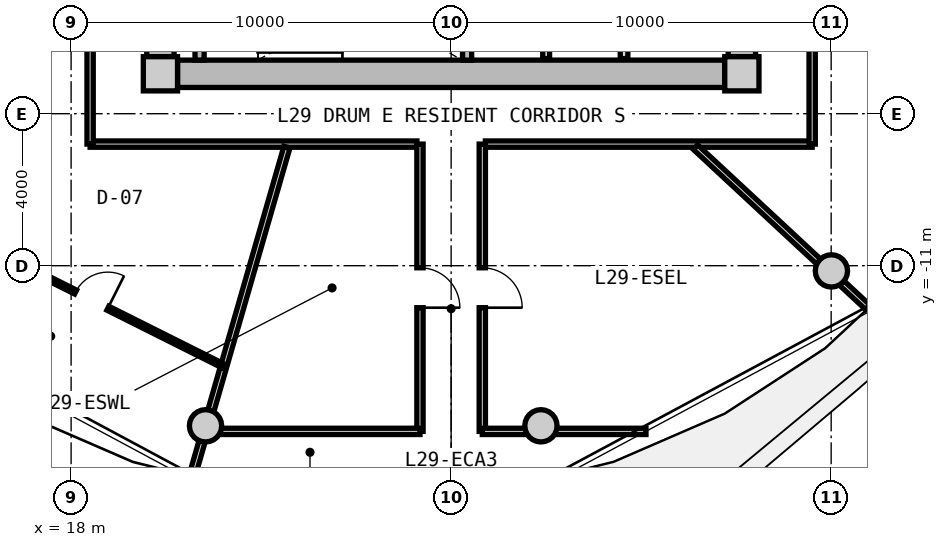
"""IFC4 building model, lengths in metres.
Left out: names, types, materials, properties, quantities, classifications, styles, units other than length and angle.
Written with IfcOpenShell. Run it as: python <this file> out.ifc"""

import sys

from ifc_helpers import new_model, si_unit, direction, frame, frame_2d, origin, origin_2d, place, context, subcontext, project, spatial, rectangle, circle, extrude, source, transform, mapped, element, fill, save


model = new_model("IFC4")
c1 = context("Model", 3, precision=1e-05, world=origin(), true_north=direction((0.0, 1.0)))
c2 = subcontext(c1, "Body", "Model", "MODEL_VIEW")
j1 = project(units=[si_unit("LENGTHUNIT", "METRE"), si_unit("PLANEANGLEUNIT", "RADIAN")], contexts=[c1])
p1 = place(None, origin())
s1 = spatial("IfcSite", under=j1, at=p1, CompositionType="ELEMENT")
p2 = place(p1, origin())
s2 = spatial("IfcBuilding", under=s1, at=p2, CompositionType="ELEMENT")
p3 = place(p2, frame((0.0, 0.0, 96.25)))
s3 = spatial("IfcBuildingStorey", under=s2, at=p3, CompositionType="ELEMENT", Elevation=96.25)
m1 = source(origin(), c2, "Body", "SweptSolid", [
    extrude(rectangle(XDim=0.9, YDim=0.9, at=origin_2d()), origin(), (0.0, 0.0, 1.0), 3.05),
])
for number, where, z_axis, x_axis in (
    (1, (20.35, -5.95, 0.0), (0.0, 0.0, 1.0), (1.0, 0.0, 0.0)),
    (2, (35.65, -5.95, 0.0), (0.0, 0.0, 1.0), (1.0, 0.0, 0.0)),
):
    element("IfcColumn", number, at=place(p3, frame(where, z_axis=z_axis, x_axis=x_axis)), inside=s3, PredefinedType="COLUMN", context=c2, shape_type="MappedRepresentation", body=[
        mapped(m1, transform((0.0, 0.0, 0.0), x_axis=(1.0, 0.0, 0.0), y_axis=(0.0, 1.0, 0.0), z_axis=(0.0, 0.0, 1.0), scale=1.0)),
    ])
m2 = source(origin(), c2, "Body", "SweptSolid", [
    extrude(rectangle(XDim=14.4, YDim=0.72, at=frame_2d((7.2, 0.0))), origin(), (0.0, 0.0, 1.0), 2.79),
])
p4 = place(p3, frame((35.2, -5.95, 0.0), z_axis=(0.0, 0.0, 1.0), x_axis=(-1.0, 0.0, 0.0)))
e3 = element("IfcWall", 3, at=p4, inside=s3, PredefinedType="SHEAR", context=c2, shape_type="MappedRepresentation", body=[
    mapped(m2, transform((0.0, 0.0, 0.0), x_axis=(1.0, 0.0, 0.0), y_axis=(0.0, 1.0, 0.0), z_axis=(0.0, 0.0, 1.0), scale=1.0)),
])
m3 = source(origin(), c2, "Body", "SweptSolid", [
    extrude(rectangle(XDim=11.0, YDim=0.72, at=frame_2d((5.5, 0.0))), origin(), (0.0, 0.0, 1.0), 2.79),
])
p5 = place(p3, frame((20.35, -5.5, 0.0), z_axis=(0.0, 0.0, 1.0), x_axis=(0.0, 1.0, 0.0)))
e4 = element("IfcWall", 4, at=p5, inside=s3, PredefinedType="SHEAR", context=c2, shape_type="MappedRepresentation", body=[
    mapped(m3, transform((0.0, 0.0, 0.0), x_axis=(1.0, 0.0, 0.0), y_axis=(0.0, 1.0, 0.0), z_axis=(0.0, 0.0, 1.0), scale=1.0)),
])
p6 = place(p5, frame((3.8, 0.0, 0.0)))
e5 = element("IfcOpeningElement", 5, at=p6, cuts=e4, PredefinedType="OPENING", context=c2, shape_type="SweptSolid", body=[
    extrude(rectangle(XDim=1.2, YDim=2.15, at=frame_2d((0.6, 1.075))), frame((0.0, 0.37, 0.0), z_axis=(0.0, -1.0, 0.0), x_axis=(1.0, 0.0, 0.0)), (0.0, 0.0, 1.0), 0.74),
])
p7 = place(p3, frame((35.65, 5.5, 0.0), z_axis=(0.0, 0.0, 1.0), x_axis=(0.0, -1.0, 0.0)))
e6 = element("IfcWall", 6, at=p7, inside=s3, PredefinedType="SHEAR", context=c2, shape_type="MappedRepresentation", body=[
    mapped(m3, transform((0.0, 0.0, 0.0), x_axis=(1.0, 0.0, 0.0), y_axis=(0.0, 1.0, 0.0), z_axis=(0.0, 0.0, 1.0), scale=1.0)),
])
p8 = place(p7, frame((5.65, 0.0, 0.0)))
e7 = element("IfcOpeningElement", 7, at=p8, cuts=e6, PredefinedType="OPENING", context=c2, shape_type="SweptSolid", body=[
    extrude(rectangle(XDim=1.2, YDim=2.15, at=frame_2d((0.6, 1.075))), frame((0.0, 0.37, 0.0), z_axis=(0.0, -1.0, 0.0), x_axis=(1.0, 0.0, 0.0)), (0.0, 0.0, 1.0), 0.74),
])
p9 = place(p7, frame((9.3, 0.0, 0.0)))
e8 = element("IfcOpeningElement", 8, at=p9, cuts=e6, PredefinedType="OPENING", context=c2, shape_type="SweptSolid", body=[
    extrude(rectangle(XDim=1.0, YDim=2.1, at=frame_2d((0.5, 1.05))), frame((0.0, 0.37, 0.0), z_axis=(0.0, -1.0, 0.0), x_axis=(1.0, 0.0, 0.0)), (0.0, 0.0, 1.0), 0.74),
])
m4 = source(origin(), c2, "Body", "SweptSolid", [
    extrude(circle(Radius=0.425, at=origin_2d()), origin(), (0.0, 0.0, 1.0), 3.05),
])
for number, where, z_axis, x_axis in (
    (9, (21.537, -15.213, 0.0), (0.0, 0.0, 1.0), (1.0, 0.0, 0.0)),
    (10, (30.363, -15.213, 0.0), (0.0, 0.0, 1.0), (1.0, 0.0, 0.0)),
    (11, (38.006, -11.137, 0.0), (0.0, 0.0, 1.0), (1.0, 0.0, 0.0)),
):
    element("IfcColumn", number, at=place(p3, frame(where, z_axis=z_axis, x_axis=x_axis)), inside=s3, PredefinedType="COLUMN", context=c2, shape_type="MappedRepresentation", body=[
        mapped(m4, transform((0.0, 0.0, 0.0), x_axis=(1.0, 0.0, 0.0), y_axis=(0.0, 1.0, 0.0), z_axis=(0.0, 0.0, 1.0), scale=1.0)),
    ])
m5 = source(origin(), c2, "Body", "SweptSolid", [
    extrude(rectangle(XDim=3.14, YDim=0.24, at=frame_2d((1.57, 0.0))), origin(), (0.0, 0.0, 1.0), 2.79),
])
for number, where, z_axis, x_axis in (
    (12, (21.38, -5.59, 0.0), (0.0, 0.0, 1.0), (0.0, 1.0, 0.0)),
    (13, (28.42, -5.59, 0.0), (0.0, 0.0, 1.0), (0.0, 1.0, 0.0)),
):
    element("IfcWall", number, at=place(p3, frame(where, z_axis=z_axis, x_axis=x_axis)), inside=s3, PredefinedType="PARTITIONING", context=c2, shape_type="MappedRepresentation", body=[
        mapped(m5, transform((0.0, 0.0, 0.0), x_axis=(1.0, 0.0, 0.0), y_axis=(0.0, 1.0, 0.0), z_axis=(0.0, 0.0, 1.0), scale=1.0)),
    ])
m6 = source(origin(), c2, "Body", "SweptSolid", [
    extrude(rectangle(XDim=3.8, YDim=0.2, at=frame_2d((1.9, 0.0))), origin(), (0.0, 0.0, 1.0), 2.775),
])
p10 = place(p3, frame((32.55, -5.55, 0.0), z_axis=(0.0, 0.0, 1.0), x_axis=(0.0, 1.0, 0.0)))
e14 = element("IfcWall", 14, at=p10, inside=s3, PredefinedType="PARTITIONING", context=c2, shape_type="MappedRepresentation", body=[
    mapped(m6, transform((0.0, 0.0, 0.0), x_axis=(1.0, 0.0, 0.0), y_axis=(0.0, 1.0, 0.0), z_axis=(0.0, 0.0, 1.0), scale=1.0)),
])
m7 = source(origin(), c2, "Body", "SweptSolid", [
    extrude(rectangle(XDim=3.22, YDim=0.18, at=frame_2d((1.61, 0.0))), origin(), (0.0, 0.0, 1.0), 2.775),
])
p11 = place(p3, frame((30.5, -5.55, 0.0), z_axis=(0.0, 0.0, 1.0), x_axis=(0.0, 1.0, 0.0)))
e15 = element("IfcWall", 15, at=p11, inside=s3, PredefinedType="PARTITIONING", context=c2, shape_type="MappedRepresentation", body=[
    mapped(m7, transform((0.0, 0.0, 0.0), x_axis=(1.0, 0.0, 0.0), y_axis=(0.0, 1.0, 0.0), z_axis=(0.0, 0.0, 1.0), scale=1.0)),
])
m8 = source(origin(), c2, "Body", "SweptSolid", [
    extrude(rectangle(XDim=8.6, YDim=0.165, at=frame_2d((4.3, 0.0))), origin(), (0.0, 0.0, 1.0), 2.775),
])
for number, where, z_axis, x_axis in (
    (16, (37.5, -7.8, 0.0), (0.0, 0.0, 1.0), (-1.0, 0.0, 0.0)),
    (17, (27.1, -7.8, 0.0), (0.0, 0.0, 1.0), (-1.0, 0.0, 0.0)),
):
    element("IfcWall", number, at=place(p3, frame(where, z_axis=z_axis, x_axis=x_axis)), inside=s3, PredefinedType="PARTITIONING", context=c2, shape_type="MappedRepresentation", body=[
        mapped(m8, transform((0.0, 0.0, 0.0), x_axis=(1.0, 0.0, 0.0), y_axis=(0.0, 1.0, 0.0), z_axis=(0.0, 0.0, 1.0), scale=1.0)),
    ])
m9 = source(origin(), c2, "Body", "SweptSolid", [
    extrude(rectangle(XDim=15.6, YDim=0.165, at=frame_2d((7.8, 0.0))), origin(), (0.0, 0.0, 1.0), 2.775),
])
p12 = place(p3, frame((18.5, -7.8, 0.0), z_axis=(0.0, 0.0, 1.0), x_axis=(0.0, 1.0, 0.0)))
e18 = element("IfcWall", 18, at=p12, inside=s3, PredefinedType="PARTITIONING", context=c2, shape_type="MappedRepresentation", body=[
    mapped(m9, transform((0.0, 0.0, 0.0), x_axis=(1.0, 0.0, 0.0), y_axis=(0.0, 1.0, 0.0), z_axis=(0.0, 0.0, 1.0), scale=1.0)),
])
p13 = place(p12, frame((5.673, 0.0, 0.0)))
e19 = element("IfcOpeningElement", 19, at=p13, cuts=e18, PredefinedType="OPENING", context=c2, shape_type="SweptSolid", body=[
    extrude(rectangle(XDim=1.05, YDim=2.15, at=frame_2d((0.525, 1.075))), frame((0.0, 0.093, 0.0), z_axis=(0.0, -1.0, 0.0), x_axis=(1.0, 0.0, 0.0)), (0.0, 0.0, 1.0), 0.185),
])
p14 = place(p3, frame((37.5, 7.8, 0.0), z_axis=(0.0, 0.0, 1.0), x_axis=(0.0, -1.0, 0.0)))
e20 = element("IfcWall", 20, at=p14, inside=s3, PredefinedType="PARTITIONING", context=c2, shape_type="MappedRepresentation", body=[
    mapped(m9, transform((0.0, 0.0, 0.0), x_axis=(1.0, 0.0, 0.0), y_axis=(0.0, 1.0, 0.0), z_axis=(0.0, 0.0, 1.0), scale=1.0)),
])
p15 = place(p14, frame((9.482, 0.0, 0.0)))
e21 = element("IfcOpeningElement", 21, at=p15, cuts=e20, PredefinedType="OPENING", context=c2, shape_type="SweptSolid", body=[
    extrude(rectangle(XDim=1.25, YDim=2.2, at=frame_2d((0.625, 1.1))), frame((0.0, 0.093, 0.0), z_axis=(0.0, -1.0, 0.0), x_axis=(1.0, 0.0, 0.0)), (0.0, 0.0, 1.0), 0.185),
])
m10 = source(origin(), c2, "Body", "SweptSolid", [
    extrude(rectangle(XDim=8.989, YDim=0.165, at=frame_2d((4.495, 0.0))), origin(), (0.0, 0.0, 1.0), 2.275),
])
p16 = place(p3, frame((23.678, -7.88, 0.0), z_axis=(0.0, 0.0, 1.0), x_axis=(-0.27702323008, -0.960863221274, 0.0)))
e22 = element("IfcWall", 22, at=p16, inside=s3, PredefinedType="PARTITIONING", context=c2, shape_type="MappedRepresentation", body=[
    mapped(m10, transform((0.0, 0.0, 0.0), x_axis=(1.0, 0.0, 0.0), y_axis=(0.0, 1.0, 0.0), z_axis=(0.0, 0.0, 1.0), scale=1.0)),
])
m11 = source(origin(), c2, "Body", "SweptSolid", [
    extrude(rectangle(XDim=6.187, YDim=0.165, at=frame_2d((3.093, 0.0))), origin(), (0.0, 0.0, 1.0), 2.275),
])
p17 = place(p3, frame((34.429, -7.88, 0.0), z_axis=(0.0, 0.0, 1.0), x_axis=(0.732501077882, -0.680765870841, 0.0)))
e23 = element("IfcWall", 23, at=p17, inside=s3, PredefinedType="PARTITIONING", context=c2, shape_type="MappedRepresentation", body=[
    mapped(m11, transform((0.0, 0.0, 0.0), x_axis=(1.0, 0.0, 0.0), y_axis=(0.0, 1.0, 0.0), z_axis=(0.0, 0.0, 1.0), scale=1.0)),
])
m12 = source(origin(), c2, "Body", "SweptSolid", [
    extrude(rectangle(XDim=7.56, YDim=0.165, at=frame_2d((3.78, 0.0))), origin(), (0.0, 0.0, 1.0), 2.775),
])
p18 = place(p3, frame((27.18, -15.36, 0.0), z_axis=(0.0, 0.0, 1.0), x_axis=(0.0, 1.0, 0.0)))
e24 = element("IfcWall", 24, at=p18, inside=s3, PredefinedType="PARTITIONING", context=c2, shape_type="MappedRepresentation", body=[
    mapped(m12, transform((0.0, 0.0, 0.0), x_axis=(1.0, 0.0, 0.0), y_axis=(0.0, 1.0, 0.0), z_axis=(0.0, 0.0, 1.0), scale=1.0)),
])
p19 = place(p18, frame((3.255, 0.0, 0.0)))
e25 = element("IfcOpeningElement", 25, at=p19, cuts=e24, PredefinedType="OPENING", context=c2, shape_type="SweptSolid", body=[
    extrude(rectangle(XDim=1.05, YDim=2.15, at=frame_2d((0.525, 1.075))), frame((0.0, 0.093, 0.0), z_axis=(0.0, -1.0, 0.0), x_axis=(1.0, 0.0, 0.0)), (0.0, 0.0, 1.0), 0.185),
])
m13 = source(origin(), c2, "Body", "SweptSolid", [
    extrude(rectangle(XDim=5.814, YDim=0.165, at=frame_2d((2.907, 0.0))), origin(), (0.0, 0.0, 1.0), 2.275),
])
p20 = place(p3, frame((21.366, -15.36, 0.0), z_axis=(0.0, 0.0, 1.0), x_axis=(1.0, 0.0, 0.0)))
e26 = element("IfcWall", 26, at=p20, inside=s3, PredefinedType="PARTITIONING", context=c2, shape_type="MappedRepresentation", body=[
    mapped(m13, transform((0.0, 0.0, 0.0), x_axis=(1.0, 0.0, 0.0), y_axis=(0.0, 1.0, 0.0), z_axis=(0.0, 0.0, 1.0), scale=1.0)),
])
p21 = place(p3, frame((28.82, -15.36, 0.0), z_axis=(0.0, 0.0, 1.0), x_axis=(0.0, 1.0, 0.0)))
e27 = element("IfcWall", 27, at=p21, inside=s3, PredefinedType="PARTITIONING", context=c2, shape_type="MappedRepresentation", body=[
    mapped(m12, transform((0.0, 0.0, 0.0), x_axis=(1.0, 0.0, 0.0), y_axis=(0.0, 1.0, 0.0), z_axis=(0.0, 0.0, 1.0), scale=1.0)),
])
p22 = place(p21, frame((3.255, 0.0, 0.0)))
e28 = element("IfcOpeningElement", 28, at=p22, cuts=e27, PredefinedType="OPENING", context=c2, shape_type="SweptSolid", body=[
    extrude(rectangle(XDim=1.05, YDim=2.15, at=frame_2d((0.525, 1.075))), frame((0.0, 0.093, 0.0), z_axis=(0.0, -1.0, 0.0), x_axis=(1.0, 0.0, 0.0)), (0.0, 0.0, 1.0), 0.185),
])
m14 = source(origin(), c2, "Body", "SweptSolid", [
    extrude(rectangle(XDim=4.307, YDim=0.165, at=frame_2d((2.153, 0.0))), origin(), (0.0, 0.0, 1.0), 2.275),
])
p23 = place(p3, frame((28.82, -15.36, 0.0), z_axis=(0.0, 0.0, 1.0), x_axis=(1.0, 0.0, 0.0)))
e29 = element("IfcWall", 29, at=p23, inside=s3, PredefinedType="PARTITIONING", context=c2, shape_type="MappedRepresentation", body=[
    mapped(m14, transform((0.0, 0.0, 0.0), x_axis=(1.0, 0.0, 0.0), y_axis=(0.0, 1.0, 0.0), z_axis=(0.0, 0.0, 1.0), scale=1.0)),
])
m15 = source(origin(), c2, "Body", "SweptSolid", [
    extrude(rectangle(XDim=7.767, YDim=0.115, at=frame_2d((3.884, 0.0))), origin(), (0.0, 0.0, 1.0), 2.775),
])
p24 = place(p3, frame((15.07, -10.167, 0.0), z_axis=(0.0, 0.0, 1.0), x_axis=(0.894188177352, -0.447691303783, 0.0)))
e30 = element("IfcWall", 30, at=p24, inside=s3, PredefinedType="PARTITIONING", context=c2, shape_type="MappedRepresentation", body=[
    mapped(m15, transform((0.0, 0.0, 0.0), x_axis=(1.0, 0.0, 0.0), y_axis=(0.0, 1.0, 0.0), z_axis=(0.0, 0.0, 1.0), scale=1.0)),
])
p25 = place(p24, frame((3.409, 0.0, 0.0)))
e31 = element("IfcOpeningElement", 31, at=p25, cuts=e30, PredefinedType="OPENING", context=c2, shape_type="SweptSolid", body=[
    extrude(rectangle(XDim=0.95, YDim=2.1, at=frame_2d((0.475, 1.05))), frame((0.0, 0.067, 0.0), z_axis=(0.0, -1.0, 0.0), x_axis=(1.0, 0.0, 0.0)), (0.0, 0.0, 1.0), 0.135),
])
m16 = source(origin(), c2, "Body", "SweptSolid", [
    extrude(rectangle(XDim=1.05, YDim=2.15, at=frame_2d((0.525, 1.075))), frame((0.0, 0.025, 0.0), z_axis=(0.0, -1.0, 0.0), x_axis=(1.0, 0.0, 0.0)), (0.0, 0.0, 1.0), 0.05),
])
p26 = place(p19, frame((1.05, 0.0, 0.0), z_axis=(0.0, 0.0, 1.0), x_axis=(-1.0, 0.0, 0.0)))
e32 = element("IfcDoor", 32, at=p26, inside=s3, OperationType="SINGLE_SWING_RIGHT", PredefinedType="DOOR", context=c2, shape_type="MappedRepresentation", body=[
    mapped(m16, transform((0.0, 0.0, 0.0), x_axis=(1.0, 0.0, 0.0), y_axis=(0.0, 1.0, 0.0), z_axis=(0.0, 0.0, 1.0), scale=1.0)),
])
fill(e25, e32)
p27 = place(p22, frame((1.05, 0.0, 0.0), z_axis=(0.0, 0.0, 1.0), x_axis=(-1.0, 0.0, 0.0)))
e33 = element("IfcDoor", 33, at=p27, inside=s3, OperationType="SINGLE_SWING_RIGHT", PredefinedType="DOOR", context=c2, shape_type="MappedRepresentation", body=[
    mapped(m16, transform((0.0, 0.0, 0.0), x_axis=(1.0, 0.0, 0.0), y_axis=(0.0, 1.0, 0.0), z_axis=(0.0, 0.0, 1.0), scale=1.0)),
])
fill(e28, e33)
m17 = source(origin(), c2, "Body", "SweptSolid", [
    extrude(rectangle(XDim=0.95, YDim=2.1, at=frame_2d((0.475, 1.05))), frame((0.0, 0.025, 0.0), z_axis=(0.0, -1.0, 0.0), x_axis=(1.0, 0.0, 0.0)), (0.0, 0.0, 1.0), 0.05),
])
p28 = place(p25, origin())
e34 = element("IfcDoor", 34, at=p28, inside=s3, OperationType="SINGLE_SWING_RIGHT", PredefinedType="DOOR", context=c2, shape_type="MappedRepresentation", body=[
    mapped(m17, transform((0.0, 0.0, 0.0), x_axis=(1.0, 0.0, 0.0), y_axis=(0.0, 1.0, 0.0), z_axis=(0.0, 0.0, 1.0), scale=1.0)),
])
fill(e31, e34)
save(model, sys.argv[1])
